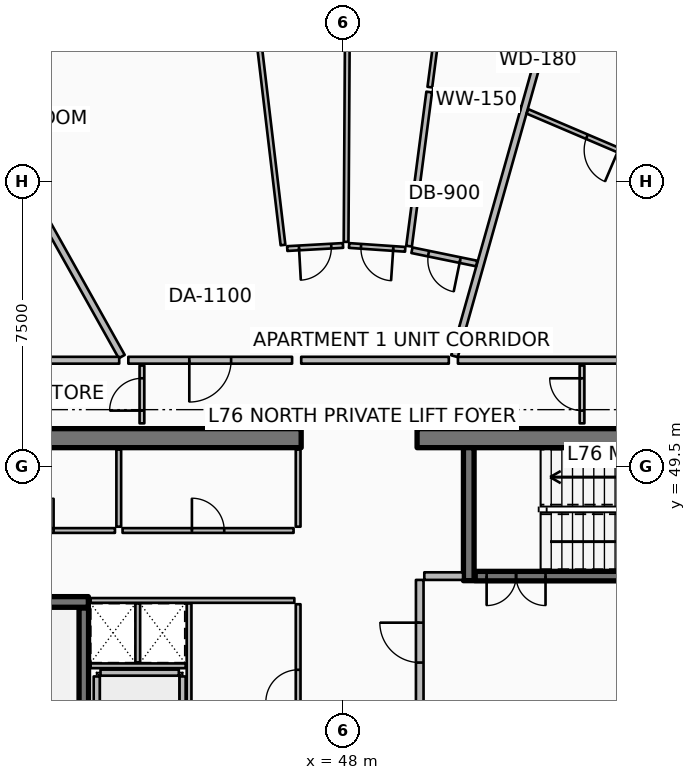
"""IFC4 building model, lengths in metres.
Left out: names, types, materials, properties, quantities, classifications, styles, units other than length and angle.
Written with IfcOpenShell. Run it as: python <this file> out.ifc"""

import sys

from ifc_helpers import new_model, si_unit, direction, frame, frame_2d, origin, place, context, subcontext, project, spatial, rectangle, extrude, element, fill, save


model = new_model("IFC4")
c1 = context("Model", 3, precision=1e-05, world=origin(), true_north=direction((0.0, 1.0)))
c2 = subcontext(c1, "Body", "Model", "MODEL_VIEW")
j1 = project(units=[si_unit("LENGTHUNIT", "METRE"), si_unit("PLANEANGLEUNIT", "RADIAN")], contexts=[c1])
p1 = place(None, origin())
s1 = spatial("IfcSite", under=j1, at=p1, CompositionType="ELEMENT")
p2 = place(p1, origin())
s2 = spatial("IfcBuilding", under=s1, at=p2, CompositionType="ELEMENT")
p3 = place(p2, frame((0.0, 0.0, 302.15)))
s3 = spatial("IfcBuildingStorey", under=s2, at=p3, CompositionType="ELEMENT", Elevation=302.15)
p4 = place(p3, frame((37.3, 50.25, 0.0), z_axis=(0.0, 0.0, 1.0), x_axis=(1.0, 0.0, 0.0)))
e1 = element("IfcWall", 1, at=p4, inside=s3, PredefinedType="SHEAR", context=c2, shape_type="SweptSolid", body=[
    extrude(rectangle(XDim=9.6, YDim=0.5, at=frame_2d((4.8, 0.0))), origin(), (0.0, 0.0, 1.0), 3.85),
])
p5 = place(p3, frame((49.95, 50.25, 0.0), z_axis=(0.0, 0.0, 1.0), x_axis=(1.0, 0.0, 0.0)))
e2 = element("IfcWall", 2, at=p5, inside=s3, PredefinedType="SHEAR", context=c2, shape_type="SweptSolid", body=[
    extrude(rectangle(XDim=9.6, YDim=0.5, at=frame_2d((4.8, 0.0))), origin(), (0.0, 0.0, 1.0), 3.85),
])
for number, where, z_axis, x_axis in (
    (3, (37.8, 45.94, 0.0), (0.0, 0.0, 1.0), (1.0, 0.0, 0.0)),
    (4, (51.31, 46.5, 0.0), (0.0, 0.0, 1.0), (0.0, 1.0, 0.0)),
):
    element("IfcWall", number, at=place(p3, frame(where, z_axis=z_axis, x_axis=x_axis)), inside=s3, PredefinedType="SHEAR", context=c2, shape_type="SweptSolid", body=[
        extrude(rectangle(XDim=3.5, YDim=0.28, at=frame_2d((1.75, 0.0))), origin(), (0.0, 0.0, 1.0), 3.85),
    ])
p6 = place(p3, frame((41.18, 38.22, 0.0), z_axis=(0.0, 0.0, 1.0), x_axis=(0.0, 1.0, 0.0)))
e5 = element("IfcWall", 5, at=p6, inside=s3, PredefinedType="SOLIDWALL", context=c2, shape_type="SweptSolid", body=[
    extrude(rectangle(XDim=7.56, YDim=0.25, at=frame_2d((3.78, 0.0))), origin(), (0.0, 0.0, 1.0), 3.45),
])
p7 = place(p6, frame((0.3, 0.0, 0.0)))
e6 = element("IfcOpeningElement", 6, at=p7, cuts=e5, PredefinedType="OPENING", context=c2, shape_type="SweptSolid", body=[
    extrude(rectangle(XDim=1.55, YDim=2.15, at=frame_2d((0.775, 1.075))), frame((0.0, 0.135, 0.0), z_axis=(0.0, -1.0, 0.0), x_axis=(1.0, 0.0, 0.0)), (0.0, 0.0, 1.0), 0.27),
])
p8 = place(p3, frame((51.48, 46.62, 0.0), z_axis=(0.0, 0.0, 1.0), x_axis=(1.0, 0.0, 0.0)))
e7 = element("IfcWall", 7, at=p8, inside=s3, PredefinedType="SOLIDWALL", context=c2, shape_type="SweptSolid", body=[
    extrude(rectangle(XDim=7.54, YDim=0.25, at=frame_2d((3.77, 0.0))), origin(), (0.0, 0.0, 1.0), 3.45),
])
p9 = place(p8, frame((0.3, 0.0, 0.0)))
e8 = element("IfcOpeningElement", 8, at=p9, cuts=e7, PredefinedType="OPENING", context=c2, shape_type="SweptSolid", body=[
    extrude(rectangle(XDim=1.55, YDim=2.15, at=frame_2d((0.775, 1.075))), frame((0.0, 0.135, 0.0), z_axis=(0.0, -1.0, 0.0), x_axis=(1.0, 0.0, 0.0)), (0.0, 0.0, 1.0), 0.27),
])
for number, where, z_axis, x_axis in (
    (9, (43.78, 41.72, 0.0), (0.0, 0.0, 1.0), (0.0, 1.0, 0.0)),
    (10, (41.52, 41.72, 0.0), (0.0, 0.0, 1.0), (0.0, 1.0, 0.0)),
):
    element("IfcWall", number, at=place(p3, frame(where, z_axis=z_axis, x_axis=x_axis)), inside=s3, PredefinedType="PARTITIONING", context=c2, shape_type="SweptSolid", body=[
        extrude(rectangle(XDim=2.26, YDim=0.16, at=frame_2d((1.13, 0.0))), origin(), (0.0, 0.0, 1.0), 3.45),
    ])
p10 = place(p3, frame((41.62, 44.08, 0.0), z_axis=(0.0, 0.0, 1.0), x_axis=(1.0, 0.0, 0.0)))
e11 = element("IfcWall", 11, at=p10, inside=s3, PredefinedType="PARTITIONING", context=c2, shape_type="SweptSolid", body=[
    extrude(rectangle(XDim=2.06, YDim=0.16, at=frame_2d((1.03, 0.0))), origin(), (0.0, 0.0, 1.0), 3.45),
])
for number, where, z_axis, x_axis in (
    (12, (46.82, 47.92, 0.0), (0.0, 0.0, 1.0), (0.0, 1.0, 0.0)),
    (13, (42.1, 47.92, 0.0), (0.0, 0.0, 1.0), (0.0, 1.0, 0.0)),
):
    element("IfcWall", number, at=place(p3, frame(where, z_axis=z_axis, x_axis=x_axis)), inside=s3, PredefinedType="PARTITIONING", context=c2, shape_type="SweptSolid", body=[
        extrude(rectangle(XDim=2.03, YDim=0.125, at=frame_2d((1.015, 0.0))), origin(), (0.0, 0.0, 1.0), 2.89),
    ])
p11 = place(p3, frame((37.92, 47.82, 0.0), z_axis=(0.0, 0.0, 1.0), x_axis=(1.0, 0.0, 0.0)))
e14 = element("IfcWall", 14, at=p11, inside=s3, PredefinedType="PARTITIONING", context=c2, shape_type="SweptSolid", body=[
    extrude(rectangle(XDim=4.08, YDim=0.125, at=frame_2d((2.04, 0.0))), origin(), (0.0, 0.0, 1.0), 2.89),
])
p12 = place(p11, frame((1.615, 0.0, 0.0)))
e15 = element("IfcOpeningElement", 15, at=p12, cuts=e14, PredefinedType="OPENING", context=c2, shape_type="SweptSolid", body=[
    extrude(rectangle(XDim=0.85, YDim=2.06, at=frame_2d((0.425, 1.03))), frame((0.0, 0.073, 0.0), z_axis=(0.0, -1.0, 0.0), x_axis=(1.0, 0.0, 0.0)), (0.0, 0.0, 1.0), 0.145),
])
p13 = place(p3, frame((42.2, 47.82, 0.0), z_axis=(0.0, 0.0, 1.0), x_axis=(1.0, 0.0, 0.0)))
e16 = element("IfcWall", 16, at=p13, inside=s3, PredefinedType="PARTITIONING", context=c2, shape_type="SweptSolid", body=[
    extrude(rectangle(XDim=4.5, YDim=0.125, at=frame_2d((2.25, 0.0))), origin(), (0.0, 0.0, 1.0), 2.89),
])
p14 = place(p13, frame((1.825, 0.0, 0.0)))
e17 = element("IfcOpeningElement", 17, at=p14, cuts=e16, PredefinedType="OPENING", context=c2, shape_type="SweptSolid", body=[
    extrude(rectangle(XDim=0.85, YDim=2.06, at=frame_2d((0.425, 1.03))), frame((0.0, 0.073, 0.0), z_axis=(0.0, -1.0, 0.0), x_axis=(1.0, 0.0, 0.0)), (0.0, 0.0, 1.0), 0.145),
])
p15 = place(p3, frame((50.14, 46.62, 0.0), z_axis=(0.0, 0.0, 1.0), x_axis=(1.0, 0.0, 0.0)))
e18 = element("IfcWall", 18, at=p15, inside=s3, PredefinedType="PARTITIONING", context=c2, shape_type="SweptSolid", body=[
    extrude(rectangle(XDim=1.02, YDim=0.2, at=frame_2d((0.51, 0.0))), origin(), (0.0, 0.0, 1.0), 3.45),
])
p16 = place(p3, frame((50.02, 43.22, 0.0), z_axis=(0.0, 0.0, 1.0), x_axis=(0.0, 1.0, 0.0)))
e19 = element("IfcWall", 19, at=p16, inside=s3, PredefinedType="PARTITIONING", context=c2, shape_type="SweptSolid", body=[
    extrude(rectangle(XDim=3.3, YDim=0.2, at=frame_2d((1.65, 0.0))), origin(), (0.0, 0.0, 1.0), 3.45),
])
p17 = place(p16, frame((1.125, 0.0, 0.0)))
e20 = element("IfcOpeningElement", 20, at=p17, cuts=e19, PredefinedType="OPENING", context=c2, shape_type="SweptSolid", body=[
    extrude(rectangle(XDim=1.05, YDim=2.1, at=frame_2d((0.525, 1.05))), frame((0.0, 0.11, 0.0), z_axis=(0.0, -1.0, 0.0), x_axis=(1.0, 0.0, 0.0)), (0.0, 0.0, 1.0), 0.22),
])
p18 = place(p3, frame((41.36, 45.98, 0.0), z_axis=(0.0, 0.0, 1.0), x_axis=(1.0, 0.0, 0.0)))
e21 = element("IfcWall", 21, at=p18, inside=s3, PredefinedType="PARTITIONING", context=c2, shape_type="SweptSolid", body=[
    extrude(rectangle(XDim=5.36, YDim=0.125, at=frame_2d((2.68, 0.0))), origin(), (0.0, 0.0, 1.0), 2.89),
])
p19 = place(p3, frame((41.36, 44.26, 0.0), z_axis=(0.0, 0.0, 1.0), x_axis=(1.0, 0.0, 0.0)))
e22 = element("IfcWall", 22, at=p19, inside=s3, PredefinedType="PARTITIONING", context=c2, shape_type="SweptSolid", body=[
    extrude(rectangle(XDim=2.5, YDim=0.125, at=frame_2d((1.25, 0.0))), origin(), (0.0, 0.0, 1.0), 2.89),
])
p20 = place(p3, frame((42.6, 44.35, 0.0), z_axis=(0.0, 0.0, 1.0), x_axis=(0.0, 1.0, 0.0)))
e23 = element("IfcWall", 23, at=p20, inside=s3, PredefinedType="PARTITIONING", context=c2, shape_type="SweptSolid", body=[
    extrude(rectangle(XDim=1.55, YDim=0.125, at=frame_2d((0.775, 0.0))), origin(), (0.0, 0.0, 1.0), 2.89),
])
p21 = place(p3, frame((43.95, 41.58, 0.0), z_axis=(0.0, 0.0, 1.0), x_axis=(0.0, 1.0, 0.0)))
e24 = element("IfcWall", 24, at=p21, inside=s3, PredefinedType="PARTITIONING", context=c2, shape_type="SweptSolid", body=[
    extrude(rectangle(XDim=4.32, YDim=0.125, at=frame_2d((2.16, 0.0))), origin(), (0.0, 0.0, 1.0), 2.89),
])
p22 = place(p3, frame((46.82, 41.58, 0.0), z_axis=(0.0, 0.0, 1.0), x_axis=(0.0, 1.0, 0.0)))
e25 = element("IfcWall", 25, at=p22, inside=s3, PredefinedType="PARTITIONING", context=c2, shape_type="SweptSolid", body=[
    extrude(rectangle(XDim=4.3, YDim=0.125, at=frame_2d((2.15, 0.0))), origin(), (0.0, 0.0, 1.0), 2.89),
])
p23 = place(p22, frame((1.725, 0.0, 0.0)))
e26 = element("IfcOpeningElement", 26, at=p23, cuts=e25, PredefinedType="OPENING", context=c2, shape_type="SweptSolid", body=[
    extrude(rectangle(XDim=0.85, YDim=2.06, at=frame_2d((0.425, 1.03))), frame((0.0, 0.073, 0.0), z_axis=(0.0, -1.0, 0.0), x_axis=(1.0, 0.0, 0.0)), (0.0, 0.0, 1.0), 0.145),
])
p24 = place(p3, frame((42.71, 50.64, 0.0), z_axis=(0.0, 0.0, 1.0), x_axis=(0.0, 1.0, 0.0)))
e27 = element("IfcWall", 27, at=p24, inside=s3, PredefinedType="PARTITIONING", context=c2, shape_type="SweptSolid", body=[
    extrude(rectangle(XDim=1.52, YDim=0.125, at=frame_2d((0.76, 0.0))), origin(), (0.0, 0.0, 1.0), 2.407),
])
p25 = place(p24, frame((0.335, 0.0, 0.0)))
e28 = element("IfcOpeningElement", 28, at=p25, cuts=e27, PredefinedType="OPENING", context=c2, shape_type="SweptSolid", body=[
    extrude(rectangle(XDim=0.85, YDim=2.06, at=frame_2d((0.425, 1.03))), frame((0.0, 0.073, 0.0), z_axis=(0.0, -1.0, 0.0), x_axis=(1.0, 0.0, 0.0)), (0.0, 0.0, 1.0), 0.145),
])
p26 = place(p3, frame((54.29, 50.64, 0.0), z_axis=(0.0, 0.0, 1.0), x_axis=(0.0, 1.0, 0.0)))
e29 = element("IfcWall", 29, at=p26, inside=s3, PredefinedType="PARTITIONING", context=c2, shape_type="SweptSolid", body=[
    extrude(rectangle(XDim=1.52, YDim=0.125, at=frame_2d((0.76, 0.0))), origin(), (0.0, 0.0, 1.0), 2.89),
])
p27 = place(p26, frame((0.335, 0.0, 0.0)))
e30 = element("IfcOpeningElement", 30, at=p27, cuts=e29, PredefinedType="OPENING", context=c2, shape_type="SweptSolid", body=[
    extrude(rectangle(XDim=0.85, YDim=2.06, at=frame_2d((0.425, 1.03))), frame((0.0, 0.073, 0.0), z_axis=(0.0, -1.0, 0.0), x_axis=(1.0, 0.0, 0.0)), (0.0, 0.0, 1.0), 0.145),
])
p28 = place(p3, frame((50.935, 52.406, 0.0), z_axis=(0.0, 0.0, 1.0), x_axis=(0.27143972755, 0.962455440167, 0.0)))
e31 = element("IfcWall", 31, at=p28, inside=s3, PredefinedType="PARTITIONING", context=c2, shape_type="SweptSolid", body=[
    extrude(rectangle(XDim=16.173, YDim=0.18, at=frame_2d((8.086, 0.0))), origin(), (0.0, 0.0, 1.0), 2.407),
])
p29 = place(p3, frame((42.178, 52.396, 0.0), z_axis=(0.0, 0.0, 1.0), x_axis=(-0.48862858053, 0.872491896976, 0.0)))
e32 = element("IfcWall", 32, at=p29, inside=s3, PredefinedType="PARTITIONING", context=c2, shape_type="SweptSolid", body=[
    extrude(rectangle(XDim=12.679, YDim=0.18, at=frame_2d((6.34, 0.0))), origin(), (0.0, 0.0, 1.0), 2.407),
])
p30 = place(p3, frame((46.661, 52.3, 0.0), z_axis=(0.0, 0.0, 1.0), x_axis=(-1.0, 0.0, 0.0)))
e33 = element("IfcWall", 33, at=p30, inside=s3, PredefinedType="PARTITIONING", context=c2, shape_type="SweptSolid", body=[
    extrude(rectangle(XDim=4.309, YDim=0.18, at=frame_2d((2.155, 0.0))), origin(), (0.0, 0.0, 1.0), 2.407),
])
p31 = place(p30, frame((1.604, 0.0, 0.0)))
e34 = element("IfcOpeningElement", 34, at=p31, cuts=e33, PredefinedType="OPENING", context=c2, shape_type="SweptSolid", body=[
    extrude(rectangle(XDim=1.1, YDim=2.1, at=frame_2d((0.55, 1.05))), frame((0.0, 0.1, 0.0), z_axis=(0.0, -1.0, 0.0), x_axis=(1.0, 0.0, 0.0)), (0.0, 0.0, 1.0), 0.2),
])
p32 = place(p3, frame((50.785, 52.3, 0.0), z_axis=(0.0, 0.0, 1.0), x_axis=(-1.0, 0.0, 0.0)))
e35 = element("IfcWall", 35, at=p32, inside=s3, PredefinedType="PARTITIONING", context=c2, shape_type="SweptSolid", body=[
    extrude(rectangle(XDim=3.884, YDim=0.18, at=frame_2d((1.942, 0.0))), origin(), (0.0, 0.0, 1.0), 2.407),
])
p33 = place(p3, frame((46.422, 55.332, 0.0), z_axis=(0.0, 0.0, 1.0), x_axis=(-0.117545090782, 0.99306754636, 0.0)))
e36 = element("IfcWall", 36, at=p33, inside=s3, PredefinedType="PARTITIONING", context=c2, shape_type="SweptSolid", body=[
    extrude(rectangle(XDim=11.27, YDim=0.125, at=frame_2d((5.635, 0.0))), origin(), (0.0, 0.0, 1.0), 2.407),
])
p34 = place(p3, frame((51.519, 54.845, 0.0), z_axis=(0.0, 0.0, 1.0), x_axis=(-0.979552357192, 0.201189412048, 0.0)))
e37 = element("IfcWall", 37, at=p34, inside=s3, PredefinedType="PARTITIONING", context=c2, shape_type="SweptSolid", body=[
    extrude(rectangle(XDim=1.739, YDim=0.15, at=frame_2d((0.87, 0.0))), origin(), (0.0, 0.0, 1.0), 2.407),
])
p35 = place(p34, frame((0.445, 0.0, 0.0)))
e38 = element("IfcOpeningElement", 38, at=p35, cuts=e37, PredefinedType="OPENING", context=c2, shape_type="SweptSolid", body=[
    extrude(rectangle(XDim=0.85, YDim=2.06, at=frame_2d((0.425, 1.03))), frame((0.0, 0.085, 0.0), z_axis=(0.0, -1.0, 0.0), x_axis=(1.0, 0.0, 0.0)), (0.0, 0.0, 1.0), 0.17),
])
p36 = place(p3, frame((52.664, 58.906, 0.0), z_axis=(0.0, 0.0, 1.0), x_axis=(-0.979585392817, 0.201028500912, 0.0)))
e39 = element("IfcWall", 39, at=p36, inside=s3, PredefinedType="PARTITIONING", context=c2, shape_type="SweptSolid", body=[
    extrude(rectangle(XDim=2.35, YDim=0.15, at=frame_2d((1.175, 0.0))), origin(), (0.0, 0.0, 1.0), 2.407),
])
p37 = place(p3, frame((49.739, 55.302, 0.0), z_axis=(0.0, 0.0, 1.0), x_axis=(0.129528016187, 0.991575762624, 0.0)))
e40 = element("IfcWall", 40, at=p37, inside=s3, PredefinedType="PARTITIONING", context=c2, shape_type="SweptSolid", body=[
    extrude(rectangle(XDim=4.09, YDim=0.15, at=frame_2d((2.045, 0.0))), origin(), (0.0, 0.0, 1.0), 2.89),
])
p38 = place(p3, frame((50.286, 59.486, 0.0), z_axis=(0.0, 0.0, 1.0), x_axis=(0.129610388033, 0.991564999036, 0.0)))
e41 = element("IfcWall", 41, at=p38, inside=s3, PredefinedType="PARTITIONING", context=c2, shape_type="SweptSolid", body=[
    extrude(rectangle(XDim=8.043, YDim=0.125, at=frame_2d((4.021, 0.0))), origin(), (0.0, 0.0, 1.0), 2.425),
])
p39 = place(p38, frame((3.596, 0.0, 0.0)))
e42 = element("IfcOpeningElement", 42, at=p39, cuts=e41, PredefinedType="OPENING", context=c2, shape_type="SweptSolid", body=[
    extrude(rectangle(XDim=0.85, YDim=2.06, at=frame_2d((0.425, 1.03))), frame((0.0, 0.073, 0.0), z_axis=(0.0, -1.0, 0.0), x_axis=(1.0, 0.0, 0.0)), (0.0, 0.0, 1.0), 0.145),
])
p40 = place(p3, frame((48.082, 55.415, 0.0), z_axis=(0.0, 0.0, 1.0), x_axis=(0.006098991746, 0.999981400977, 0.0)))
e43 = element("IfcWall", 43, at=p40, inside=s3, PredefinedType="PARTITIONING", context=c2, shape_type="SweptSolid", body=[
    extrude(rectangle(XDim=11.569, YDim=0.125, at=frame_2d((5.784, 0.0))), origin(), (0.0, 0.0, 1.0), 2.425),
])
p41 = place(p3, frame((49.637, 55.219, 0.0), z_axis=(0.0, 0.0, 1.0), x_axis=(-0.997687761927, 0.067964179549, 0.0)))
e44 = element("IfcWall", 44, at=p41, inside=s3, PredefinedType="PARTITIONING", context=c2, shape_type="SweptSolid", body=[
    extrude(rectangle(XDim=1.48, YDim=0.125, at=frame_2d((0.74, 0.0))), origin(), (0.0, 0.0, 1.0), 2.89),
])
p42 = place(p41, frame((0.315, 0.0, 0.0)))
e45 = element("IfcOpeningElement", 45, at=p42, cuts=e44, PredefinedType="OPENING", context=c2, shape_type="SweptSolid", body=[
    extrude(rectangle(XDim=0.85, YDim=2.06, at=frame_2d((0.425, 1.03))), frame((0.0, 0.073, 0.0), z_axis=(0.0, -1.0, 0.0), x_axis=(1.0, 0.0, 0.0)), (0.0, 0.0, 1.0), 0.145),
])
p43 = place(p3, frame((48.001, 55.32, 0.0), z_axis=(0.0, 0.0, 1.0), x_axis=(-0.998441385069, -0.0558103985, 0.0)))
e46 = element("IfcWall", 46, at=p43, inside=s3, PredefinedType="PARTITIONING", context=c2, shape_type="SweptSolid", body=[
    extrude(rectangle(XDim=1.47, YDim=0.125, at=frame_2d((0.735, 0.0))), origin(), (0.0, 0.0, 1.0), 2.89),
])
p44 = place(p43, frame((0.31, 0.0, 0.0)))
e47 = element("IfcOpeningElement", 47, at=p44, cuts=e46, PredefinedType="OPENING", context=c2, shape_type="SweptSolid", body=[
    extrude(rectangle(XDim=0.85, YDim=2.06, at=frame_2d((0.425, 1.03))), frame((0.0, 0.073, 0.0), z_axis=(0.0, -1.0, 0.0), x_axis=(1.0, 0.0, 0.0)), (0.0, 0.0, 1.0), 0.145),
])
p45 = place(p3, frame((42.112, 52.3, 0.0), z_axis=(0.0, 0.0, 1.0), x_axis=(-1.0, 0.0, 0.0)))
e48 = element("IfcWall", 48, at=p45, inside=s3, PredefinedType="PARTITIONING", context=c2, shape_type="SweptSolid", body=[
    extrude(rectangle(XDim=4.692, YDim=0.18, at=frame_2d((2.346, 0.0))), origin(), (0.0, 0.0, 1.0), 2.407),
])
p46 = place(p3, frame((56.0, 52.3, 0.0), z_axis=(0.0, 0.0, 1.0), x_axis=(-1.0, 0.0, 0.0)))
e49 = element("IfcWall", 49, at=p46, inside=s3, PredefinedType="PARTITIONING", context=c2, shape_type="SweptSolid", body=[
    extrude(rectangle(XDim=4.975, YDim=0.18, at=frame_2d((2.488, 0.0))), origin(), (0.0, 0.0, 1.0), 2.407),
])
p47 = place(p3, frame((56.811, 57.162, 0.0), z_axis=(0.0, 0.0, 1.0), x_axis=(-0.919947770822, 0.392040940414, 0.0)))
e50 = element("IfcWall", 50, at=p47, inside=s3, PredefinedType="PARTITIONING", context=c2, shape_type="SweptSolid", body=[
    extrude(rectangle(XDim=4.3, YDim=0.125, at=frame_2d((2.15, 0.0))), origin(), (0.0, 0.0, 1.0), 2.407),
])
p48 = place(p47, frame((1.7, 0.0, 0.0)))
e51 = element("IfcOpeningElement", 51, at=p48, cuts=e50, PredefinedType="OPENING", context=c2, shape_type="SweptSolid", body=[
    extrude(rectangle(XDim=0.9, YDim=2.08, at=frame_2d((0.45, 1.04))), frame((0.0, 0.073, 0.0), z_axis=(0.0, -1.0, 0.0), x_axis=(1.0, 0.0, 0.0)), (0.0, 0.0, 1.0), 0.145),
])
p49 = place(p9, origin())
e52 = element("IfcDoor", 52, at=p49, inside=s3, OperationType="DOUBLE_DOOR_SINGLE_SWING", PredefinedType="DOOR", context=c2, shape_type="SweptSolid", body=[
    extrude(rectangle(XDim=1.55, YDim=2.15, at=frame_2d((0.775, 1.075))), frame((0.0, 0.025, 0.0), z_axis=(0.0, -1.0, 0.0), x_axis=(1.0, 0.0, 0.0)), (0.0, 0.0, 1.0), 0.05),
])
fill(e8, e52)
p50 = place(p12, origin())
e53 = element("IfcDoor", 53, at=p50, inside=s3, OperationType="SINGLE_SWING_RIGHT", PredefinedType="DOOR", context=c2, shape_type="SweptSolid", body=[
    extrude(rectangle(XDim=0.85, YDim=2.06, at=frame_2d((0.425, 1.03))), frame((0.0, 0.025, 0.0), z_axis=(0.0, -1.0, 0.0), x_axis=(1.0, 0.0, 0.0)), (0.0, 0.0, 1.0), 0.05),
])
fill(e15, e53)
p51 = place(p14, origin())
e54 = element("IfcDoor", 54, at=p51, inside=s3, OperationType="SINGLE_SWING_LEFT", PredefinedType="DOOR", context=c2, shape_type="SweptSolid", body=[
    extrude(rectangle(XDim=0.85, YDim=2.06, at=frame_2d((0.425, 1.03))), frame((0.0, 0.025, 0.0), z_axis=(0.0, -1.0, 0.0), x_axis=(1.0, 0.0, 0.0)), (0.0, 0.0, 1.0), 0.05),
])
fill(e17, e54)
p52 = place(p17, origin())
e55 = element("IfcDoor", 55, at=p52, inside=s3, OperationType="SINGLE_SWING_RIGHT", PredefinedType="DOOR", context=c2, shape_type="SweptSolid", body=[
    extrude(rectangle(XDim=1.05, YDim=2.1, at=frame_2d((0.525, 1.05))), frame((0.0, 0.025, 0.0), z_axis=(0.0, -1.0, 0.0), x_axis=(1.0, 0.0, 0.0)), (0.0, 0.0, 1.0), 0.05),
])
fill(e20, e55)
p53 = place(p23, origin())
e56 = element("IfcDoor", 56, at=p53, inside=s3, OperationType="SINGLE_SWING_LEFT", PredefinedType="DOOR", context=c2, shape_type="SweptSolid", body=[
    extrude(rectangle(XDim=0.85, YDim=2.06, at=frame_2d((0.425, 1.03))), frame((0.0, 0.025, 0.0), z_axis=(0.0, -1.0, 0.0), x_axis=(1.0, 0.0, 0.0)), (0.0, 0.0, 1.0), 0.05),
])
fill(e26, e56)
p54 = place(p25, origin())
e57 = element("IfcDoor", 57, at=p54, inside=s3, OperationType="SINGLE_SWING_LEFT", PredefinedType="DOOR", context=c2, shape_type="SweptSolid", body=[
    extrude(rectangle(XDim=0.85, YDim=2.06, at=frame_2d((0.425, 1.03))), frame((0.0, 0.025, 0.0), z_axis=(0.0, -1.0, 0.0), x_axis=(1.0, 0.0, 0.0)), (0.0, 0.0, 1.0), 0.05),
])
fill(e28, e57)
p55 = place(p27, origin())
e58 = element("IfcDoor", 58, at=p55, inside=s3, OperationType="SINGLE_SWING_RIGHT", PredefinedType="DOOR", context=c2, shape_type="SweptSolid", body=[
    extrude(rectangle(XDim=0.85, YDim=2.06, at=frame_2d((0.425, 1.03))), frame((0.0, 0.025, 0.0), z_axis=(0.0, -1.0, 0.0), x_axis=(1.0, 0.0, 0.0)), (0.0, 0.0, 1.0), 0.05),
])
fill(e30, e58)
p56 = place(p31, origin())
e59 = element("IfcDoor", 59, at=p56, inside=s3, OperationType="SINGLE_SWING_RIGHT", PredefinedType="DOOR", context=c2, shape_type="SweptSolid", body=[
    extrude(rectangle(XDim=1.1, YDim=2.1, at=frame_2d((0.55, 1.05))), frame((0.0, 0.025, 0.0), z_axis=(0.0, -1.0, 0.0), x_axis=(1.0, 0.0, 0.0)), (0.0, 0.0, 1.0), 0.05),
])
fill(e34, e59)
p57 = place(p35, origin())
e60 = element("IfcDoor", 60, at=p57, inside=s3, OperationType="SINGLE_SWING_LEFT", PredefinedType="DOOR", context=c2, shape_type="SweptSolid", body=[
    extrude(rectangle(XDim=0.85, YDim=2.06, at=frame_2d((0.425, 1.03))), frame((0.0, 0.025, 0.0), z_axis=(0.0, -1.0, 0.0), x_axis=(1.0, 0.0, 0.0)), (0.0, 0.0, 1.0), 0.05),
])
fill(e38, e60)
p58 = place(p42, origin())
e61 = element("IfcDoor", 61, at=p58, inside=s3, OperationType="SINGLE_SWING_LEFT", PredefinedType="DOOR", context=c2, shape_type="SweptSolid", body=[
    extrude(rectangle(XDim=0.85, YDim=2.06, at=frame_2d((0.425, 1.03))), frame((0.0, 0.025, 0.0), z_axis=(0.0, -1.0, 0.0), x_axis=(1.0, 0.0, 0.0)), (0.0, 0.0, 1.0), 0.05),
])
fill(e45, e61)
p59 = place(p44, origin())
e62 = element("IfcDoor", 62, at=p59, inside=s3, OperationType="SINGLE_SWING_RIGHT", PredefinedType="DOOR", context=c2, shape_type="SweptSolid", body=[
    extrude(rectangle(XDim=0.85, YDim=2.06, at=frame_2d((0.425, 1.03))), frame((0.0, 0.025, 0.0), z_axis=(0.0, -1.0, 0.0), x_axis=(1.0, 0.0, 0.0)), (0.0, 0.0, 1.0), 0.05),
])
fill(e47, e62)
p60 = place(p48, origin())
e63 = element("IfcDoor", 63, at=p60, inside=s3, OperationType="SINGLE_SWING_LEFT", PredefinedType="DOOR", context=c2, shape_type="SweptSolid", body=[
    extrude(rectangle(XDim=0.9, YDim=2.08, at=frame_2d((0.45, 1.04))), frame((0.0, 0.025, 0.0), z_axis=(0.0, -1.0, 0.0), x_axis=(1.0, 0.0, 0.0)), (0.0, 0.0, 1.0), 0.05),
])
fill(e51, e63)
save(model, sys.argv[1])
